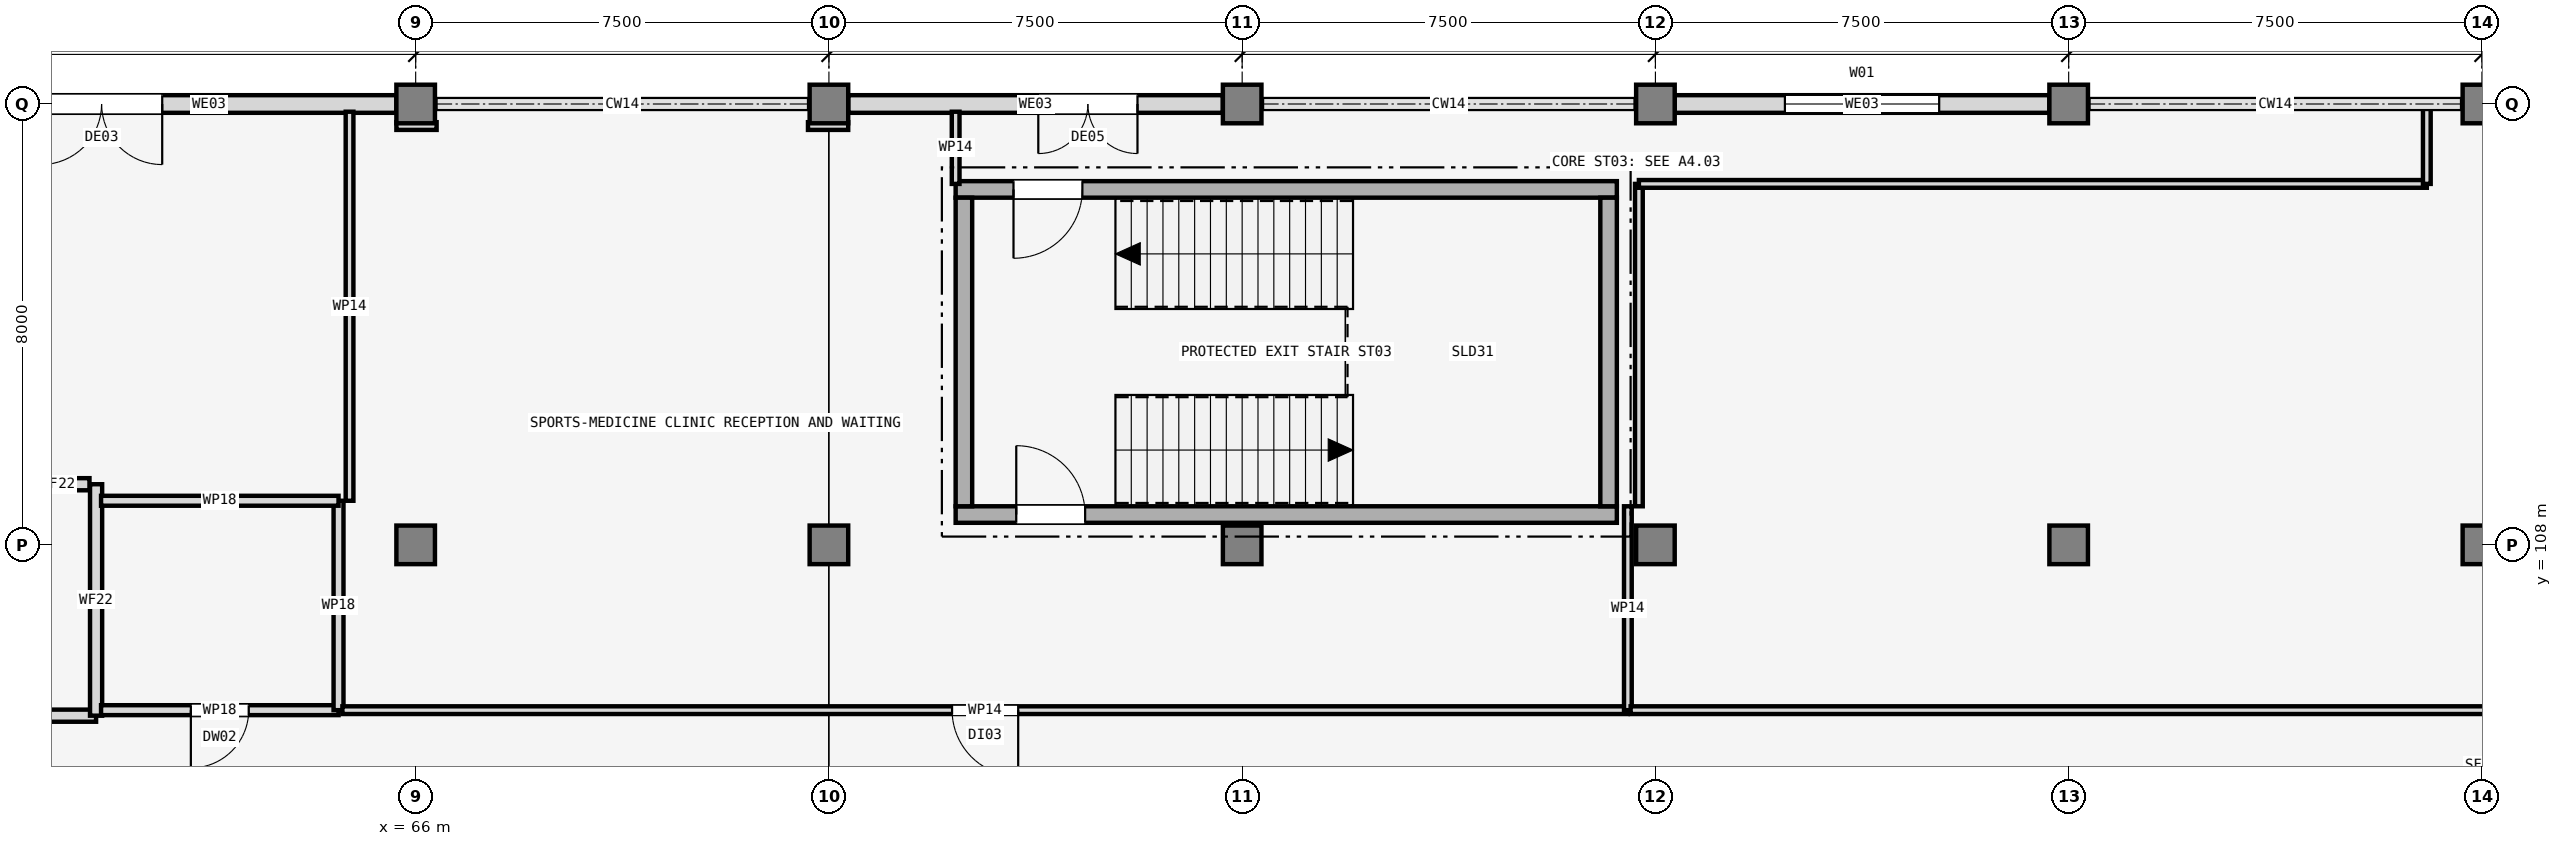
"""IFC4 building model, lengths in metres.
Left out: names, types, materials, properties, quantities, classifications, styles, units other than length and angle.
Written with IfcOpenShell. Run it as: python <this file> out.ifc"""

import sys

from ifc_helpers import new_model, si_unit, direction, frame, frame_2d, origin, origin_2d, place, context, subcontext, project, spatial, rectangle, extrude, element, fill, save


model = new_model("IFC4")
c1 = context("Model", 3, precision=1e-05, world=origin(), true_north=direction((0.0, 1.0)))
c2 = subcontext(c1, "Body", "Model", "MODEL_VIEW")
j1 = project(units=[si_unit("LENGTHUNIT", "METRE"), si_unit("PLANEANGLEUNIT", "RADIAN")], contexts=[c1])
p1 = place(None, origin())
s1 = spatial("IfcSite", under=j1, at=p1, CompositionType="ELEMENT")
p2 = place(p1, origin())
s2 = spatial("IfcBuilding", under=s1, at=p2, CompositionType="ELEMENT")
p3 = place(p2, origin())
s3 = spatial("IfcBuildingStorey", under=s2, at=p3, CompositionType="ELEMENT", Elevation=0.0)
for number, where, z_axis, x_axis in (
    (1, (66.0, 108.0, 0.0), (0.0, 0.0, 1.0), (1.0, 0.0, 0.0)),
    (2, (66.0, 116.0, 0.0), (0.0, 0.0, 1.0), (1.0, 0.0, 0.0)),
    (3, (73.5, 108.0, 0.0), (0.0, 0.0, 1.0), (1.0, 0.0, 0.0)),
    (4, (73.5, 116.0, 0.0), (0.0, 0.0, 1.0), (1.0, 0.0, 0.0)),
    (5, (81.0, 108.0, 0.0), (0.0, 0.0, 1.0), (1.0, 0.0, 0.0)),
    (6, (81.0, 116.0, 0.0), (0.0, 0.0, 1.0), (1.0, 0.0, 0.0)),
    (7, (88.5, 108.0, 0.0), (0.0, 0.0, 1.0), (1.0, 0.0, 0.0)),
    (8, (88.5, 116.0, 0.0), (0.0, 0.0, 1.0), (1.0, 0.0, 0.0)),
    (9, (96.0, 108.0, 0.0), (0.0, 0.0, 1.0), (1.0, 0.0, 0.0)),
    (10, (96.0, 116.0, 0.0), (0.0, 0.0, 1.0), (1.0, 0.0, 0.0)),
    (11, (103.5, 108.0, 0.0), (0.0, 0.0, 1.0), (1.0, 0.0, 0.0)),
    (12, (103.5, 116.0, 0.0), (0.0, 0.0, 1.0), (1.0, 0.0, 0.0)),
):
    element("IfcColumn", number, at=place(p3, frame(where, z_axis=z_axis, x_axis=x_axis)), inside=s3, PredefinedType="COLUMN", context=c2, shape_type="SweptSolid", body=[
        extrude(rectangle(XDim=0.7, YDim=0.7, at=origin_2d()), origin(), (0.0, 0.0, 1.0), 4.8),
    ])
p4 = place(p3, frame((65.65, 116.0, 0.0), z_axis=(0.0, 0.0, 1.0), x_axis=(-1.0, 0.0, 0.0)))
e13 = element("IfcWall", 13, at=p4, inside=s3, PredefinedType="SOLIDWALL", context=c2, shape_type="SweptSolid", body=[
    extrude(rectangle(XDim=6.8, YDim=0.32, at=frame_2d((3.4, 0.0))), origin(), (0.0, 0.0, 1.0), 3.93),
])
p5 = place(p4, frame((4.25, 0.0, 0.0)))
e14 = element("IfcOpeningElement", 14, at=p5, cuts=e13, PredefinedType="OPENING", context=c2, shape_type="SweptSolid", body=[
    extrude(rectangle(XDim=2.2, YDim=2.35, at=frame_2d((1.1, 1.175))), frame((0.0, 0.17, 0.0), z_axis=(0.0, -1.0, 0.0), x_axis=(1.0, 0.0, 0.0)), (0.0, 0.0, 1.0), 0.34),
])
p6 = place(p3, frame((80.65, 116.0, 0.0), z_axis=(0.0, 0.0, 1.0), x_axis=(-1.0, 0.0, 0.0)))
e15 = element("IfcWall", 15, at=p6, inside=s3, PredefinedType="SOLIDWALL", context=c2, shape_type="SweptSolid", body=[
    extrude(rectangle(XDim=6.8, YDim=0.32, at=frame_2d((3.4, 0.0))), origin(), (0.0, 0.0, 1.0), 3.93),
])
p7 = place(p6, frame((1.55, 0.0, 0.0)))
e16 = element("IfcOpeningElement", 16, at=p7, cuts=e15, PredefinedType="OPENING", context=c2, shape_type="SweptSolid", body=[
    extrude(rectangle(XDim=1.8, YDim=2.2, at=frame_2d((0.9, 1.1))), frame((0.0, 0.17, 0.0), z_axis=(0.0, -1.0, 0.0), x_axis=(1.0, 0.0, 0.0)), (0.0, 0.0, 1.0), 0.34),
])
p8 = place(p3, frame((95.65, 116.0, 0.0), z_axis=(0.0, 0.0, 1.0), x_axis=(-1.0, 0.0, 0.0)))
e17 = element("IfcWall", 17, at=p8, inside=s3, PredefinedType="SOLIDWALL", context=c2, shape_type="SweptSolid", body=[
    extrude(rectangle(XDim=6.8, YDim=0.32, at=frame_2d((3.4, 0.0))), origin(), (0.0, 0.0, 1.0), 3.93),
])
p9 = place(p8, frame((2.0, 0.0, 0.95)))
e18 = element("IfcOpeningElement", 18, at=p9, cuts=e17, PredefinedType="OPENING", context=c2, shape_type="SweptSolid", body=[
    extrude(rectangle(XDim=2.8, YDim=1.85, at=frame_2d((1.4, 0.925))), frame((0.0, 0.17, 0.0), z_axis=(0.0, -1.0, 0.0), x_axis=(1.0, 0.0, 0.0)), (0.0, 0.0, 1.0), 0.34),
])
p10 = place(p3, frame((75.8, 108.55, 0.0), z_axis=(0.0, 0.0, 1.0), x_axis=(1.0, 0.0, 0.0)))
e19 = element("IfcWall", 19, at=p10, inside=s3, PredefinedType="SHEAR", context=c2, shape_type="SweptSolid", body=[
    extrude(rectangle(XDim=12.0, YDim=0.3, at=frame_2d((6.0, 0.0))), origin(), (0.0, 0.0, 1.0), 4.8),
])
p11 = place(p10, frame((1.1, 0.0, 0.0)))
e20 = element("IfcOpeningElement", 20, at=p11, cuts=e19, PredefinedType="OPENING", context=c2, shape_type="SweptSolid", body=[
    extrude(rectangle(XDim=1.25, YDim=2.15, at=frame_2d((0.625, 1.075))), frame((0.0, 0.16, 0.0), z_axis=(0.0, -1.0, 0.0), x_axis=(1.0, 0.0, 0.0)), (0.0, 0.0, 1.0), 0.32),
])
p12 = place(p3, frame((87.8, 114.45, 0.0), z_axis=(0.0, 0.0, 1.0), x_axis=(-1.0, 0.0, 0.0)))
e21 = element("IfcWall", 21, at=p12, inside=s3, PredefinedType="SHEAR", context=c2, shape_type="SweptSolid", body=[
    extrude(rectangle(XDim=12.0, YDim=0.3, at=frame_2d((6.0, 0.0))), origin(), (0.0, 0.0, 1.0), 4.8),
])
p13 = place(p12, frame((9.7, 0.0, 0.0)))
e22 = element("IfcOpeningElement", 22, at=p13, cuts=e21, PredefinedType="OPENING", context=c2, shape_type="SweptSolid", body=[
    extrude(rectangle(XDim=1.25, YDim=2.15, at=frame_2d((0.625, 1.075))), frame((0.0, 0.16, 0.0), z_axis=(0.0, -1.0, 0.0), x_axis=(1.0, 0.0, 0.0)), (0.0, 0.0, 1.0), 0.32),
])
for number, where, z_axis, x_axis in (
    (23, (75.95, 114.3, 0.0), (0.0, 0.0, 1.0), (0.0, -1.0, 0.0)),
    (24, (87.65, 108.7, 0.0), (0.0, 0.0, 1.0), (0.0, 1.0, 0.0)),
):
    element("IfcWall", number, at=place(p3, frame(where, z_axis=z_axis, x_axis=x_axis)), inside=s3, PredefinedType="SHEAR", context=c2, shape_type="SweptSolid", body=[
        extrude(rectangle(XDim=5.6, YDim=0.3, at=frame_2d((2.8, 0.0))), origin(), (0.0, 0.0, 1.0), 4.8),
    ])
p14 = place(p3, frame((55.92, 104.9, 0.0), z_axis=(0.0, 0.0, 1.0), x_axis=(1.0, 0.0, 0.0)))
e25 = element("IfcWall", 25, at=p14, inside=s3, PredefinedType="SOLIDWALL", context=c2, shape_type="SweptSolid", body=[
    extrude(rectangle(XDim=4.28, YDim=0.22, at=frame_2d((2.14, 0.0))), origin(), (0.0, 0.0, 1.0), 3.68),
])
p15 = place(p14, frame((1.24, 0.0, 0.0)))
e26 = element("IfcOpeningElement", 26, at=p15, cuts=e25, PredefinedType="OPENING", context=c2, shape_type="SweptSolid", body=[
    extrude(rectangle(XDim=1.8, YDim=2.2, at=frame_2d((0.9, 1.1))), frame((0.0, 0.12, 0.0), z_axis=(0.0, -1.0, 0.0), x_axis=(1.0, 0.0, 0.0)), (0.0, 0.0, 1.0), 0.24),
])
p16 = place(p3, frame((60.2, 104.9, 0.0), z_axis=(0.0, 0.0, 1.0), x_axis=(0.0, 1.0, 0.0)))
e27 = element("IfcWall", 27, at=p16, inside=s3, PredefinedType="SOLIDWALL", context=c2, shape_type="SweptSolid", body=[
    extrude(rectangle(XDim=4.2, YDim=0.22, at=frame_2d((2.1, 0.0))), origin(), (0.0, 0.0, 1.0), 3.68),
])
p17 = place(p3, frame((58.95, 109.1, 0.0), z_axis=(0.0, 0.0, 1.0), x_axis=(1.0, 0.0, 0.0)))
e28 = element("IfcWall", 28, at=p17, inside=s3, PredefinedType="SOLIDWALL", context=c2, shape_type="SweptSolid", body=[
    extrude(rectangle(XDim=1.13, YDim=0.22, at=frame_2d((0.565, 0.0))), origin(), (0.0, 0.0, 1.0), 3.68),
])
p18 = place(p3, frame((64.6, 105.0, 0.0), z_axis=(0.0, 0.0, 1.0), x_axis=(-1.0, 0.0, 0.0)))
e29 = element("IfcWall", 29, at=p18, inside=s3, PredefinedType="PARTITIONING", context=c2, shape_type="SweptSolid", body=[
    extrude(rectangle(XDim=4.31, YDim=0.18, at=frame_2d((2.155, 0.0))), origin(), (0.0, 0.0, 1.0), 3.68),
])
p19 = place(p18, frame((1.63, 0.0, 0.0)))
e30 = element("IfcOpeningElement", 30, at=p19, cuts=e29, PredefinedType="OPENING", context=c2, shape_type="SweptSolid", body=[
    extrude(rectangle(XDim=1.05, YDim=2.1, at=frame_2d((0.525, 1.05))), frame((0.0, 0.1, 0.0), z_axis=(0.0, -1.0, 0.0), x_axis=(1.0, 0.0, 0.0)), (0.0, 0.0, 1.0), 0.2),
])
p20 = place(p3, frame((64.6, 108.8, 0.0), z_axis=(0.0, 0.0, 1.0), x_axis=(0.0, -1.0, 0.0)))
e31 = element("IfcWall", 31, at=p20, inside=s3, PredefinedType="PARTITIONING", context=c2, shape_type="SweptSolid", body=[
    extrude(rectangle(XDim=3.8, YDim=0.18, at=frame_2d((1.9, 0.0))), origin(), (0.0, 0.0, 1.0), 3.68),
])
p21 = place(p3, frame((60.29, 108.8, 0.0), z_axis=(0.0, 0.0, 1.0), x_axis=(1.0, 0.0, 0.0)))
e32 = element("IfcWall", 32, at=p21, inside=s3, PredefinedType="PARTITIONING", context=c2, shape_type="SweptSolid", body=[
    extrude(rectangle(XDim=4.31, YDim=0.18, at=frame_2d((2.155, 0.0))), origin(), (0.0, 0.0, 1.0), 3.68),
])
p22 = place(p3, frame((88.0, 105.0, 0.0), z_axis=(0.0, 0.0, 1.0), x_axis=(-1.0, 0.0, 0.0)))
e33 = element("IfcWall", 33, at=p22, inside=s3, PredefinedType="PARTITIONING", context=c2, shape_type="SweptSolid", body=[
    extrude(rectangle(XDim=23.33, YDim=0.14, at=frame_2d((11.665, 0.0))), origin(), (0.0, 0.0, 1.0), 3.68),
])
p23 = place(p22, frame((11.065, 0.0, 0.0)))
e34 = element("IfcOpeningElement", 34, at=p23, cuts=e33, PredefinedType="OPENING", context=c2, shape_type="SweptSolid", body=[
    extrude(rectangle(XDim=1.2, YDim=2.15, at=frame_2d((0.6, 1.075))), frame((0.0, 0.08, 0.0), z_axis=(0.0, -1.0, 0.0), x_axis=(1.0, 0.0, 0.0)), (0.0, 0.0, 1.0), 0.16),
])
p24 = place(p3, frame((88.0, 108.7, 0.0), z_axis=(0.0, 0.0, 1.0), x_axis=(0.0, -1.0, 0.0)))
e35 = element("IfcWall", 35, at=p24, inside=s3, PredefinedType="PARTITIONING", context=c2, shape_type="SweptSolid", body=[
    extrude(rectangle(XDim=3.7, YDim=0.14, at=frame_2d((1.85, 0.0))), origin(), (0.0, 0.0, 1.0), 3.68),
])
p25 = place(p3, frame((64.8, 108.8, 0.0), z_axis=(0.0, 0.0, 1.0), x_axis=(0.0, 1.0, 0.0)))
e36 = element("IfcWall", 36, at=p25, inside=s3, PredefinedType="PARTITIONING", context=c2, shape_type="SweptSolid", body=[
    extrude(rectangle(XDim=7.06, YDim=0.14, at=frame_2d((3.53, 0.0))), origin(), (0.0, 0.0, 1.0), 3.68),
])
p26 = place(p3, frame((75.8, 115.86, 0.0), z_axis=(0.0, 0.0, 1.0), x_axis=(0.0, -1.0, 0.0)))
e37 = element("IfcWall", 37, at=p26, inside=s3, PredefinedType="PARTITIONING", context=c2, shape_type="SweptSolid", body=[
    extrude(rectangle(XDim=1.31, YDim=0.14, at=frame_2d((0.655, 0.0))), origin(), (0.0, 0.0, 1.0), 3.68),
])
for number, where, z_axis, x_axis in (
    (38, (65.65, 115.6, 0.0), (0.0, 0.0, 1.0), (1.0, 0.0, 0.0)),
    (39, (73.12, 115.6, 0.0), (0.0, 0.0, 1.0), (1.0, 0.0, 0.0)),
):
    element("IfcWall", number, at=place(p3, frame(where, z_axis=z_axis, x_axis=x_axis)), inside=s3, PredefinedType="PARTITIONING", context=c2, shape_type="SweptSolid", body=[
        extrude(rectangle(XDim=0.73, YDim=0.14, at=frame_2d((0.365, 0.0))), origin(), (0.0, 0.0, 1.0), 3.68),
    ])
p27 = place(p3, frame((133.36, 105.0, 0.0), z_axis=(0.0, 0.0, 1.0), x_axis=(-1.0, 0.0, 0.0)))
e40 = element("IfcWall", 40, at=p27, inside=s3, PredefinedType="PARTITIONING", context=c2, shape_type="SweptSolid", body=[
    extrude(rectangle(XDim=45.31, YDim=0.14, at=frame_2d((22.655, 0.0))), origin(), (0.0, 0.0, 1.0), 3.68),
])
p28 = place(p27, frame((22.055, 0.0, 0.0)))
e41 = element("IfcOpeningElement", 41, at=p28, cuts=e40, PredefinedType="OPENING", context=c2, shape_type="SweptSolid", body=[
    extrude(rectangle(XDim=1.2, YDim=2.15, at=frame_2d((0.6, 1.075))), frame((0.0, 0.08, 0.0), z_axis=(0.0, -1.0, 0.0), x_axis=(1.0, 0.0, 0.0)), (0.0, 0.0, 1.0), 0.16),
])
p29 = place(p3, frame((88.2, 108.7, 0.0), z_axis=(0.0, 0.0, 1.0), x_axis=(0.0, 1.0, 0.0)))
e42 = element("IfcWall", 42, at=p29, inside=s3, PredefinedType="PARTITIONING", context=c2, shape_type="SweptSolid", body=[
    extrude(rectangle(XDim=5.85, YDim=0.14, at=frame_2d((2.925, 0.0))), origin(), (0.0, 0.0, 1.0), 3.68),
])
p30 = place(p3, frame((88.2, 114.55, 0.0), z_axis=(0.0, 0.0, 1.0), x_axis=(1.0, 0.0, 0.0)))
e43 = element("IfcWall", 43, at=p30, inside=s3, PredefinedType="PARTITIONING", context=c2, shape_type="SweptSolid", body=[
    extrude(rectangle(XDim=14.3, YDim=0.14, at=frame_2d((7.15, 0.0))), origin(), (0.0, 0.0, 1.0), 3.68),
])
p31 = place(p3, frame((102.5, 114.55, 0.0), z_axis=(0.0, 0.0, 1.0), x_axis=(0.0, 1.0, 0.0)))
e44 = element("IfcWall", 44, at=p31, inside=s3, PredefinedType="PARTITIONING", context=c2, shape_type="SweptSolid", body=[
    extrude(rectangle(XDim=1.388, YDim=0.14, at=frame_2d((0.694, 0.0))), origin(), (0.0, 0.0, 1.0), 3.68),
])
p32 = place(p5, frame((2.2, 0.0, 0.0), z_axis=(0.0, 0.0, 1.0), x_axis=(-1.0, 0.0, 0.0)))
e45 = element("IfcDoor", 45, at=p32, inside=s3, OperationType="DOUBLE_DOOR_SINGLE_SWING", PredefinedType="DOOR", context=c2, shape_type="SweptSolid", body=[
    extrude(rectangle(XDim=2.2, YDim=2.35, at=frame_2d((1.1, 1.175))), frame((0.0, 0.025, 0.0), z_axis=(0.0, -1.0, 0.0), x_axis=(1.0, 0.0, 0.0)), (0.0, 0.0, 1.0), 0.05),
])
fill(e14, e45)
p33 = place(p7, frame((1.8, 0.0, 0.0), z_axis=(0.0, 0.0, 1.0), x_axis=(-1.0, 0.0, 0.0)))
e46 = element("IfcDoor", 46, at=p33, inside=s3, OperationType="DOUBLE_DOOR_SINGLE_SWING", PredefinedType="DOOR", context=c2, shape_type="SweptSolid", body=[
    extrude(rectangle(XDim=1.8, YDim=2.2, at=frame_2d((0.9, 1.1))), frame((0.0, 0.025, 0.0), z_axis=(0.0, -1.0, 0.0), x_axis=(1.0, 0.0, 0.0)), (0.0, 0.0, 1.0), 0.05),
])
fill(e16, e46)
p34 = place(p9, origin())
e47 = element("IfcWindow", 47, at=p34, inside=s3, PartitioningType="SINGLE_PANEL", PredefinedType="WINDOW", context=c2, shape_type="SweptSolid", body=[
    extrude(rectangle(XDim=2.8, YDim=1.85, at=frame_2d((1.4, 0.925))), frame((0.0, 0.03, 0.0), z_axis=(0.0, -1.0, 0.0), x_axis=(1.0, 0.0, 0.0)), (0.0, 0.0, 1.0), 0.06),
])
fill(e18, e47)
p35 = place(p11, origin())
e48 = element("IfcDoor", 48, at=p35, inside=s3, OperationType="SINGLE_SWING_LEFT", PredefinedType="DOOR", context=c2, shape_type="SweptSolid", body=[
    extrude(rectangle(XDim=1.25, YDim=2.15, at=frame_2d((0.625, 1.075))), frame((0.0, 0.025, 0.0), z_axis=(0.0, -1.0, 0.0), x_axis=(1.0, 0.0, 0.0)), (0.0, 0.0, 1.0), 0.05),
])
fill(e20, e48)
p36 = place(p13, origin())
e49 = element("IfcDoor", 49, at=p36, inside=s3, OperationType="SINGLE_SWING_RIGHT", PredefinedType="DOOR", context=c2, shape_type="SweptSolid", body=[
    extrude(rectangle(XDim=1.25, YDim=2.15, at=frame_2d((0.625, 1.075))), frame((0.0, 0.025, 0.0), z_axis=(0.0, -1.0, 0.0), x_axis=(1.0, 0.0, 0.0)), (0.0, 0.0, 1.0), 0.05),
])
fill(e22, e49)
p37 = place(p19, origin())
e50 = element("IfcDoor", 50, at=p37, inside=s3, OperationType="SINGLE_SWING_RIGHT", PredefinedType="DOOR", context=c2, shape_type="SweptSolid", body=[
    extrude(rectangle(XDim=1.05, YDim=2.1, at=frame_2d((0.525, 1.05))), frame((0.0, 0.025, 0.0), z_axis=(0.0, -1.0, 0.0), x_axis=(1.0, 0.0, 0.0)), (0.0, 0.0, 1.0), 0.05),
])
fill(e30, e50)
p38 = place(p23, origin())
e51 = element("IfcDoor", 51, at=p38, inside=s3, OperationType="SINGLE_SWING_LEFT", PredefinedType="DOOR", context=c2, shape_type="SweptSolid", body=[
    extrude(rectangle(XDim=1.2, YDim=2.15, at=frame_2d((0.6, 1.075))), frame((0.0, 0.025, 0.0), z_axis=(0.0, -1.0, 0.0), x_axis=(1.0, 0.0, 0.0)), (0.0, 0.0, 1.0), 0.05),
])
fill(e34, e51)
save(model, sys.argv[1])
